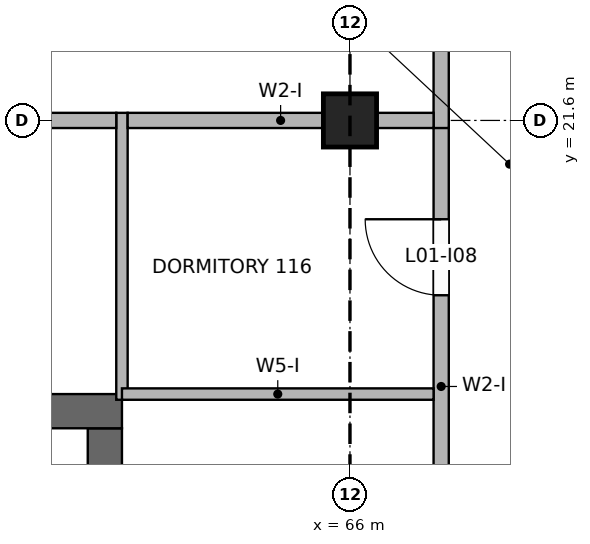
"""IFC4 building model, lengths in metres.
Left out: names, types, materials, properties, quantities, classifications, styles, units other than length and angle.
Written with IfcOpenShell. Run it as: python <this file> out.ifc"""

import sys

from ifc_helpers import new_model, si_unit, direction, frame, frame_2d, origin, origin_2d, place, context, subcontext, project, spatial, rectangle, extrude, element, fill, save


model = new_model("IFC4")
c1 = context("Model", 3, precision=1e-05, world=origin(), true_north=direction((0.0, 1.0)))
c2 = subcontext(c1, "Body", "Model", "MODEL_VIEW")
j1 = project(units=[si_unit("LENGTHUNIT", "METRE"), si_unit("PLANEANGLEUNIT", "RADIAN")], contexts=[c1])
p1 = place(None, origin())
s1 = spatial("IfcSite", under=j1, at=p1, CompositionType="ELEMENT")
p2 = place(p1, origin())
s2 = spatial("IfcBuilding", under=s1, at=p2, CompositionType="ELEMENT")
p3 = place(p2, frame((0.0, 0.0, 4.2)))
s3 = spatial("IfcBuildingStorey", under=s2, at=p3, CompositionType="ELEMENT", Elevation=4.2)
p4 = place(p3, frame((60.0, 17.775, 0.0), z_axis=(0.0, 0.0, 1.0), x_axis=(1.0, 0.0, 0.0)))
e1 = element("IfcWall", 1, at=p4, inside=s3, PredefinedType="SHEAR", context=c2, shape_type="SweptSolid", body=[
    extrude(rectangle(XDim=3.0, YDim=0.45, at=frame_2d((1.5, 0.0))), origin(), (0.0, 0.0, 1.0), 4.2),
])
p5 = place(p3, frame((62.775, 14.85, 0.0), z_axis=(0.0, 0.0, 1.0), x_axis=(0.0, 1.0, 0.0)))
e2 = element("IfcWall", 2, at=p5, inside=s3, PredefinedType="SHEAR", context=c2, shape_type="SweptSolid", body=[
    extrude(rectangle(XDim=2.7, YDim=0.45, at=frame_2d((1.35, 0.0))), origin(), (0.0, 0.0, 1.0), 4.2),
])
p6 = place(p3, frame((66.0, 21.6, 0.0), z_axis=(0.0, 0.0, 1.0), x_axis=(1.0, 0.0, 0.0)))
e3 = element("IfcColumn", 3, at=p6, inside=s3, PredefinedType="COLUMN", context=c2, shape_type="SweptSolid", body=[
    extrude(rectangle(XDim=0.7, YDim=0.7, at=origin_2d()), origin(), (0.0, 0.0, 1.0), 3.95),
])
p7 = place(p3, frame((63.0, 17.925, 0.0), z_axis=(0.0, 0.0, 1.0), x_axis=(0.0, 1.0, 0.0)))
e4 = element("IfcWall", 4, at=p7, inside=s3, PredefinedType="PARTITIONING", context=c2, shape_type="SweptSolid", body=[
    extrude(rectangle(XDim=3.775, YDim=0.15, at=frame_2d((1.887, 0.0))), origin(), (0.0, 0.0, 1.0), 2.55),
])
p8 = place(p3, frame((67.2, 14.5, 0.0), z_axis=(0.0, 0.0, 1.0), x_axis=(0.0, 1.0, 0.0)))
e5 = element("IfcWall", 5, at=p8, inside=s3, PredefinedType="PARTITIONING", context=c2, shape_type="SweptSolid", body=[
    extrude(rectangle(XDim=7.2, YDim=0.2, at=frame_2d((3.6, 0.0))), origin(), (0.0, 0.0, 1.0), 2.55),
])
p9 = place(p8, frame((1.25, 0.0, 0.0)))
e6 = element("IfcOpeningElement", 6, at=p9, cuts=e5, PredefinedType="OPENING", context=c2, shape_type="SweptSolid", body=[
    extrude(rectangle(XDim=1.0, YDim=2.1, at=frame_2d((0.5, 1.05))), frame((0.0, 0.11, 0.0), z_axis=(0.0, -1.0, 0.0), x_axis=(1.0, 0.0, 0.0)), (0.0, 0.0, 1.0), 0.22),
])
p10 = place(p8, frame((4.8, 0.0, 0.0)))
e7 = element("IfcOpeningElement", 7, at=p10, cuts=e5, PredefinedType="OPENING", context=c2, shape_type="SweptSolid", body=[
    extrude(rectangle(XDim=1.0, YDim=2.1, at=frame_2d((0.5, 1.05))), frame((0.0, 0.11, 0.0), z_axis=(0.0, -1.0, 0.0), x_axis=(1.0, 0.0, 0.0)), (0.0, 0.0, 1.0), 0.22),
])
p11 = place(p3, frame((67.2, 21.5, 0.0), z_axis=(0.0, 0.0, 1.0), x_axis=(0.0, 1.0, 0.0)))
e8 = element("IfcWall", 8, at=p11, inside=s3, PredefinedType="PARTITIONING", context=c2, shape_type="SweptSolid", body=[
    extrude(rectangle(XDim=6.05, YDim=0.2, at=frame_2d((3.025, 0.0))), origin(), (0.0, 0.0, 1.0), 2.55),
])
p12 = place(p11, frame((2.575, 0.0, 0.0)))
e9 = element("IfcOpeningElement", 9, at=p12, cuts=e8, PredefinedType="OPENING", context=c2, shape_type="SweptSolid", body=[
    extrude(rectangle(XDim=1.0, YDim=2.1, at=frame_2d((0.5, 1.05))), frame((0.0, 0.11, 0.0), z_axis=(0.0, -1.0, 0.0), x_axis=(1.0, 0.0, 0.0)), (0.0, 0.0, 1.0), 0.22),
])
p13 = place(p3, frame((63.0, 18.0, 0.0), z_axis=(0.0, 0.0, 1.0), x_axis=(1.0, 0.0, 0.0)))
e10 = element("IfcWall", 10, at=p13, inside=s3, PredefinedType="PARTITIONING", context=c2, shape_type="SweptSolid", body=[
    extrude(rectangle(XDim=4.1, YDim=0.15, at=frame_2d((2.05, 0.0))), origin(), (0.0, 0.0, 1.0), 3.05),
])
p14 = place(p3, frame((60.15, 21.6, 0.0), z_axis=(0.0, 0.0, 1.0), x_axis=(1.0, 0.0, 0.0)))
e11 = element("IfcWall", 11, at=p14, inside=s3, PredefinedType="PARTITIONING", context=c2, shape_type="SweptSolid", body=[
    extrude(rectangle(XDim=2.775, YDim=0.2, at=frame_2d((1.388, 0.0))), origin(), (0.0, 0.0, 1.0), 2.55),
])
p15 = place(p3, frame((63.075, 21.6, 0.0), z_axis=(0.0, 0.0, 1.0), x_axis=(1.0, 0.0, 0.0)))
e12 = element("IfcWall", 12, at=p15, inside=s3, PredefinedType="PARTITIONING", context=c2, shape_type="SweptSolid", body=[
    extrude(rectangle(XDim=4.025, YDim=0.2, at=frame_2d((2.013, 0.0))), origin(), (0.0, 0.0, 1.0), 2.55),
])
p16 = place(p10, origin())
e13 = element("IfcDoor", 13, at=p16, inside=s3, OperationType="SINGLE_SWING_RIGHT", PredefinedType="DOOR", context=c2, shape_type="SweptSolid", body=[
    extrude(rectangle(XDim=1.0, YDim=2.1, at=frame_2d((0.5, 1.05))), frame((0.0, 0.025, 0.0), z_axis=(0.0, -1.0, 0.0), x_axis=(1.0, 0.0, 0.0)), (0.0, 0.0, 1.0), 0.05),
])
fill(e7, e13)
save(model, sys.argv[1])
